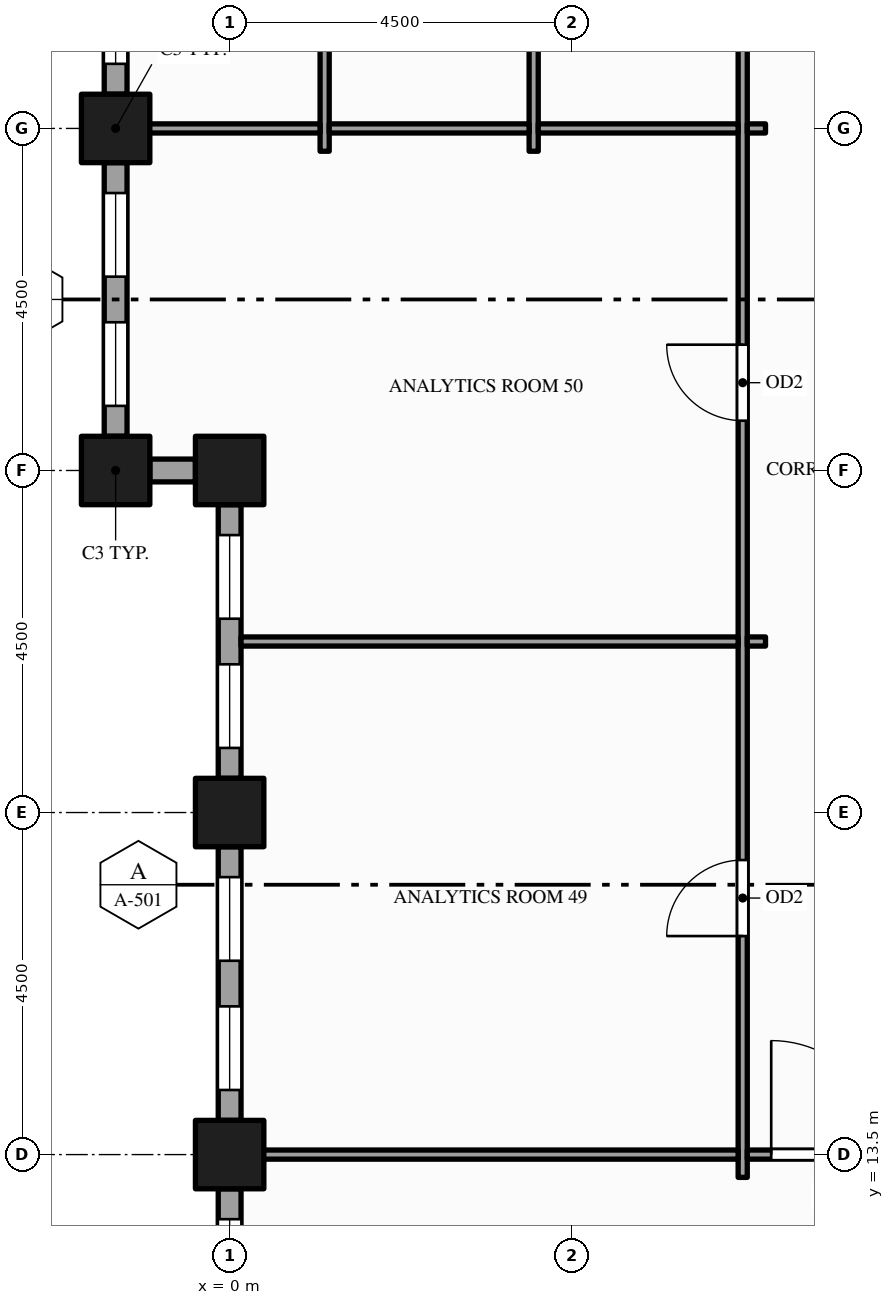
"""IFC4 building model, lengths in metres.
Left out: names, types, materials, properties, quantities, classifications, styles, units other than length and angle.
Written with IfcOpenShell. Run it as: python <this file> out.ifc"""

import sys

from ifc_helpers import new_model, si_unit, direction, frame, frame_2d, origin, origin_2d, place, context, subcontext, project, spatial, rectangle, hollow_rectangle, extrude, element, fill, save


model = new_model("IFC4")
c1 = context("Model", 3, precision=1e-05, world=origin(), true_north=direction((0.0, 1.0)))
c2 = subcontext(c1, "Body", "Model", "MODEL_VIEW")
j1 = project(units=[si_unit("LENGTHUNIT", "METRE"), si_unit("PLANEANGLEUNIT", "RADIAN")], contexts=[c1])
p1 = place(None, origin())
s1 = spatial("IfcSite", under=j1, at=p1, CompositionType="ELEMENT")
p2 = place(p1, origin())
s2 = spatial("IfcBuilding", under=s1, at=p2, CompositionType="ELEMENT")
p3 = place(p2, frame((0.0, 0.0, 171.0)))
s3 = spatial("IfcBuildingStorey", under=s2, at=p3, CompositionType="ELEMENT", Elevation=171.0)
for number, where, z_axis, x_axis in (
    (1, (-1.5, 22.5, -0.15), (0.0, 0.0, 1.0), (1.0, 0.0, 0.0)),
    (2, (-1.5, 27.0, -0.15), (0.0, 0.0, 1.0), (1.0, 0.0, 0.0)),
    (3, (0.0, 13.5, -0.15), (0.0, 0.0, 1.0), (1.0, 0.0, 0.0)),
    (4, (0.0, 18.0, -0.15), (0.0, 0.0, 1.0), (1.0, 0.0, 0.0)),
    (5, (0.0, 22.5, -0.15), (0.0, 0.0, 1.0), (1.0, 0.0, 0.0)),
):
    element("IfcColumn", number, at=place(p3, frame(where, z_axis=z_axis, x_axis=x_axis)), inside=s3, PredefinedType="COLUMN", context=c2, shape_type="SweptSolid", body=[
        extrude(hollow_rectangle(XDim=0.9, YDim=0.9, WallThickness=0.045, at=origin_2d()), origin(), (0.0, 0.0, 1.0), 4.0),
    ])
p4 = place(p3, frame((-1.5, 31.05, 0.0), z_axis=(0.0, 0.0, 1.0), x_axis=(0.0, -1.0, 0.0)))
e6 = element("IfcWall", 6, at=p4, inside=s3, PredefinedType="STANDARD", context=c2, shape_type="SweptSolid", body=[
    extrude(rectangle(XDim=3.6, YDim=0.3, at=frame_2d((1.8, 0.0))), origin(), (0.0, 0.0, 1.0), 3.149),
])
p5 = place(p4, frame((0.4, 0.0, 0.9)))
e7 = element("IfcOpeningElement", 7, at=p5, cuts=e6, PredefinedType="OPENING", context=c2, shape_type="SweptSolid", body=[
    extrude(rectangle(XDim=1.1, YDim=2.0, at=frame_2d((0.55, 1.0))), frame((0.0, 0.16, 0.0), z_axis=(0.0, -1.0, 0.0), x_axis=(1.0, 0.0, 0.0)), (0.0, 0.0, 1.0), 0.32),
])
p6 = place(p4, frame((2.1, 0.0, 0.9)))
e8 = element("IfcOpeningElement", 8, at=p6, cuts=e6, PredefinedType="OPENING", context=c2, shape_type="SweptSolid", body=[
    extrude(rectangle(XDim=1.1, YDim=2.0, at=frame_2d((0.55, 1.0))), frame((0.0, 0.16, 0.0), z_axis=(0.0, -1.0, 0.0), x_axis=(1.0, 0.0, 0.0)), (0.0, 0.0, 1.0), 0.32),
])
p7 = place(p3, frame((-1.5, 26.55, 0.0), z_axis=(0.0, 0.0, 1.0), x_axis=(0.0, -1.0, 0.0)))
e9 = element("IfcWall", 9, at=p7, inside=s3, PredefinedType="STANDARD", context=c2, shape_type="SweptSolid", body=[
    extrude(rectangle(XDim=3.6, YDim=0.3, at=frame_2d((1.8, 0.0))), origin(), (0.0, 0.0, 1.0), 3.149),
])
p8 = place(p7, frame((0.4, 0.0, 0.9)))
e10 = element("IfcOpeningElement", 10, at=p8, cuts=e9, PredefinedType="OPENING", context=c2, shape_type="SweptSolid", body=[
    extrude(rectangle(XDim=1.1, YDim=2.0, at=frame_2d((0.55, 1.0))), frame((0.0, 0.16, 0.0), z_axis=(0.0, -1.0, 0.0), x_axis=(1.0, 0.0, 0.0)), (0.0, 0.0, 1.0), 0.32),
])
p9 = place(p7, frame((2.1, 0.0, 0.9)))
e11 = element("IfcOpeningElement", 11, at=p9, cuts=e9, PredefinedType="OPENING", context=c2, shape_type="SweptSolid", body=[
    extrude(rectangle(XDim=1.1, YDim=2.0, at=frame_2d((0.55, 1.0))), frame((0.0, 0.16, 0.0), z_axis=(0.0, -1.0, 0.0), x_axis=(1.0, 0.0, 0.0)), (0.0, 0.0, 1.0), 0.32),
])
p10 = place(p3, frame((-1.05, 22.5, 0.0), z_axis=(0.0, 0.0, 1.0), x_axis=(1.0, 0.0, 0.0)))
e12 = element("IfcWall", 12, at=p10, inside=s3, PredefinedType="STANDARD", context=c2, shape_type="SweptSolid", body=[
    extrude(rectangle(XDim=0.6, YDim=0.3, at=frame_2d((0.3, 0.0))), origin(), (0.0, 0.0, 1.0), 3.149),
])
p11 = place(p3, frame((0.0, 22.05, 0.0), z_axis=(0.0, 0.0, 1.0), x_axis=(0.0, -1.0, 0.0)))
e13 = element("IfcWall", 13, at=p11, inside=s3, PredefinedType="STANDARD", context=c2, shape_type="SweptSolid", body=[
    extrude(rectangle(XDim=3.6, YDim=0.3, at=frame_2d((1.8, 0.0))), origin(), (0.0, 0.0, 1.0), 3.149),
])
p12 = place(p11, frame((0.4, 0.0, 0.9)))
e14 = element("IfcOpeningElement", 14, at=p12, cuts=e13, PredefinedType="OPENING", context=c2, shape_type="SweptSolid", body=[
    extrude(rectangle(XDim=1.1, YDim=2.0, at=frame_2d((0.55, 1.0))), frame((0.0, 0.16, 0.0), z_axis=(0.0, -1.0, 0.0), x_axis=(1.0, 0.0, 0.0)), (0.0, 0.0, 1.0), 0.32),
])
p13 = place(p11, frame((2.1, 0.0, 0.9)))
e15 = element("IfcOpeningElement", 15, at=p13, cuts=e13, PredefinedType="OPENING", context=c2, shape_type="SweptSolid", body=[
    extrude(rectangle(XDim=1.1, YDim=2.0, at=frame_2d((0.55, 1.0))), frame((0.0, 0.16, 0.0), z_axis=(0.0, -1.0, 0.0), x_axis=(1.0, 0.0, 0.0)), (0.0, 0.0, 1.0), 0.32),
])
p14 = place(p3, frame((0.0, 17.55, 0.0), z_axis=(0.0, 0.0, 1.0), x_axis=(0.0, -1.0, 0.0)))
e16 = element("IfcWall", 16, at=p14, inside=s3, PredefinedType="STANDARD", context=c2, shape_type="SweptSolid", body=[
    extrude(rectangle(XDim=3.6, YDim=0.3, at=frame_2d((1.8, 0.0))), origin(), (0.0, 0.0, 1.0), 3.149),
])
p15 = place(p14, frame((0.4, 0.0, 0.9)))
e17 = element("IfcOpeningElement", 17, at=p15, cuts=e16, PredefinedType="OPENING", context=c2, shape_type="SweptSolid", body=[
    extrude(rectangle(XDim=1.1, YDim=2.0, at=frame_2d((0.55, 1.0))), frame((0.0, 0.16, 0.0), z_axis=(0.0, -1.0, 0.0), x_axis=(1.0, 0.0, 0.0)), (0.0, 0.0, 1.0), 0.32),
])
p16 = place(p14, frame((2.1, 0.0, 0.9)))
e18 = element("IfcOpeningElement", 18, at=p16, cuts=e16, PredefinedType="OPENING", context=c2, shape_type="SweptSolid", body=[
    extrude(rectangle(XDim=1.1, YDim=2.0, at=frame_2d((0.55, 1.0))), frame((0.0, 0.16, 0.0), z_axis=(0.0, -1.0, 0.0), x_axis=(1.0, 0.0, 0.0)), (0.0, 0.0, 1.0), 0.32),
])
p17 = place(p3, frame((0.0, 13.05, 0.0), z_axis=(0.0, 0.0, 1.0), x_axis=(0.0, -1.0, 0.0)))
e19 = element("IfcWall", 19, at=p17, inside=s3, PredefinedType="STANDARD", context=c2, shape_type="SweptSolid", body=[
    extrude(rectangle(XDim=3.6, YDim=0.3, at=frame_2d((1.8, 0.0))), origin(), (0.0, 0.0, 1.0), 3.149),
])
p18 = place(p17, frame((0.4, 0.0, 0.9)))
e20 = element("IfcOpeningElement", 20, at=p18, cuts=e19, PredefinedType="OPENING", context=c2, shape_type="SweptSolid", body=[
    extrude(rectangle(XDim=1.1, YDim=2.0, at=frame_2d((0.55, 1.0))), frame((0.0, 0.16, 0.0), z_axis=(0.0, -1.0, 0.0), x_axis=(1.0, 0.0, 0.0)), (0.0, 0.0, 1.0), 0.32),
])
p19 = place(p17, frame((2.1, 0.0, 0.9)))
e21 = element("IfcOpeningElement", 21, at=p19, cuts=e19, PredefinedType="OPENING", context=c2, shape_type="SweptSolid", body=[
    extrude(rectangle(XDim=1.1, YDim=2.0, at=frame_2d((0.55, 1.0))), frame((0.0, 0.16, 0.0), z_axis=(0.0, -1.0, 0.0), x_axis=(1.0, 0.0, 0.0)), (0.0, 0.0, 1.0), 0.32),
])
for number, where, z_axis, x_axis in (
    (22, (1.25, 26.7, 0.0), (0.0, 0.0, 1.0), (0.0, 1.0, 0.0)),
    (23, (4.0, 26.7, 0.0), (0.0, 0.0, 1.0), (0.0, 1.0, 0.0)),
):
    element("IfcWall", number, at=place(p3, frame(where, z_axis=z_axis, x_axis=x_axis)), inside=s3, PredefinedType="PARTITIONING", context=c2, shape_type="SweptSolid", body=[
        extrude(rectangle(XDim=5.1, YDim=0.12, at=frame_2d((2.55, 0.0))), origin(), (0.0, 0.0, 1.0), 3.85),
    ])
p20 = place(p3, frame((6.75, 13.2, 0.0), z_axis=(0.0, 0.0, 1.0), x_axis=(0.0, 1.0, 0.0)))
e24 = element("IfcWall", 24, at=p20, inside=s3, PredefinedType="PARTITIONING", context=c2, shape_type="SweptSolid", body=[
    extrude(rectangle(XDim=18.6, YDim=0.12, at=frame_2d((9.3, 0.0))), origin(), (0.0, 0.0, 1.0), 2.6),
])
p21 = place(p20, frame((3.175, 0.0, 0.0)))
e25 = element("IfcOpeningElement", 25, at=p21, cuts=e24, PredefinedType="OPENING", context=c2, shape_type="SweptSolid", body=[
    extrude(rectangle(XDim=1.0, YDim=2.1, at=frame_2d((0.5, 1.05))), frame((0.0, 0.07, 0.0), z_axis=(0.0, -1.0, 0.0), x_axis=(1.0, 0.0, 0.0)), (0.0, 0.0, 1.0), 0.14),
])
p22 = place(p20, frame((9.955, 0.0, 0.0)))
e26 = element("IfcOpeningElement", 26, at=p22, cuts=e24, PredefinedType="OPENING", context=c2, shape_type="SweptSolid", body=[
    extrude(rectangle(XDim=1.0, YDim=2.1, at=frame_2d((0.5, 1.05))), frame((0.0, 0.07, 0.0), z_axis=(0.0, -1.0, 0.0), x_axis=(1.0, 0.0, 0.0)), (0.0, 0.0, 1.0), 0.14),
])
p23 = place(p3, frame((0.15, 13.5, 0.0), z_axis=(0.0, 0.0, 1.0), x_axis=(1.0, 0.0, 0.0)))
e27 = element("IfcWall", 27, at=p23, inside=s3, PredefinedType="PARTITIONING", context=c2, shape_type="SweptSolid", body=[
    extrude(rectangle(XDim=6.54, YDim=0.12, at=frame_2d((3.27, 0.0))), origin(), (0.0, 0.0, 1.0), 2.87),
])
p24 = place(p3, frame((6.81, 13.5, 0.0), z_axis=(0.0, 0.0, 1.0), x_axis=(1.0, 0.0, 0.0)))
e28 = element("IfcWall", 28, at=p24, inside=s3, PredefinedType="PARTITIONING", context=c2, shape_type="SweptSolid", body=[
    extrude(rectangle(XDim=2.13, YDim=0.12, at=frame_2d((1.065, 0.0))), origin(), (0.0, 0.0, 1.0), 2.87),
])
p25 = place(p24, frame((0.315, 0.0, 0.0)))
e29 = element("IfcOpeningElement", 29, at=p25, cuts=e28, PredefinedType="OPENING", context=c2, shape_type="SweptSolid", body=[
    extrude(rectangle(XDim=1.5, YDim=2.1, at=frame_2d((0.75, 1.05))), frame((0.0, 0.07, 0.0), z_axis=(0.0, -1.0, 0.0), x_axis=(1.0, 0.0, 0.0)), (0.0, 0.0, 1.0), 0.14),
])
p26 = place(p3, frame((0.15, 20.25, 0.0), z_axis=(0.0, 0.0, 1.0), x_axis=(1.0, 0.0, 0.0)))
e30 = element("IfcWall", 30, at=p26, inside=s3, PredefinedType="PARTITIONING", context=c2, shape_type="SweptSolid", body=[
    extrude(rectangle(XDim=6.54, YDim=0.12, at=frame_2d((3.27, 0.0))), origin(), (0.0, 0.0, 1.0), 2.87),
])
p27 = place(p3, frame((6.81, 20.25, 0.0), z_axis=(0.0, 0.0, 1.0), x_axis=(1.0, 0.0, 0.0)))
e31 = element("IfcWall", 31, at=p27, inside=s3, PredefinedType="PARTITIONING", context=c2, shape_type="SweptSolid", body=[
    extrude(rectangle(XDim=0.24, YDim=0.12, at=frame_2d((0.12, 0.0))), origin(), (0.0, 0.0, 1.0), 2.87),
])
p28 = place(p3, frame((-1.35, 27.0, 0.0), z_axis=(0.0, 0.0, 1.0), x_axis=(1.0, 0.0, 0.0)))
e32 = element("IfcWall", 32, at=p28, inside=s3, PredefinedType="PARTITIONING", context=c2, shape_type="SweptSolid", body=[
    extrude(rectangle(XDim=2.54, YDim=0.12, at=frame_2d((1.27, 0.0))), origin(), (0.0, 0.0, 1.0), 2.87),
])
for number, where, z_axis, x_axis in (
    (33, (1.31, 27.0, 0.0), (0.0, 0.0, 1.0), (1.0, 0.0, 0.0)),
    (34, (4.06, 27.0, 0.0), (0.0, 0.0, 1.0), (1.0, 0.0, 0.0)),
):
    element("IfcWall", number, at=place(p3, frame(where, z_axis=z_axis, x_axis=x_axis)), inside=s3, PredefinedType="PARTITIONING", context=c2, shape_type="SweptSolid", body=[
        extrude(rectangle(XDim=2.63, YDim=0.12, at=frame_2d((1.315, 0.0))), origin(), (0.0, 0.0, 1.0), 2.87),
    ])
p29 = place(p3, frame((6.81, 27.0, 0.0), z_axis=(0.0, 0.0, 1.0), x_axis=(1.0, 0.0, 0.0)))
e35 = element("IfcWall", 35, at=p29, inside=s3, PredefinedType="PARTITIONING", context=c2, shape_type="SweptSolid", body=[
    extrude(rectangle(XDim=0.24, YDim=0.12, at=frame_2d((0.12, 0.0))), origin(), (0.0, 0.0, 1.0), 2.87),
])
p30 = place(p6, origin())
e36 = element("IfcWindow", 36, at=p30, inside=s3, PartitioningType="SINGLE_PANEL", PredefinedType="WINDOW", context=c2, shape_type="SweptSolid", body=[
    extrude(rectangle(XDim=1.1, YDim=2.0, at=frame_2d((0.55, 1.0))), frame((0.0, 0.03, 0.0), z_axis=(0.0, -1.0, 0.0), x_axis=(1.0, 0.0, 0.0)), (0.0, 0.0, 1.0), 0.06),
])
fill(e8, e36)
p31 = place(p8, origin())
e37 = element("IfcWindow", 37, at=p31, inside=s3, PartitioningType="SINGLE_PANEL", PredefinedType="WINDOW", context=c2, shape_type="SweptSolid", body=[
    extrude(rectangle(XDim=1.1, YDim=2.0, at=frame_2d((0.55, 1.0))), frame((0.0, 0.03, 0.0), z_axis=(0.0, -1.0, 0.0), x_axis=(1.0, 0.0, 0.0)), (0.0, 0.0, 1.0), 0.06),
])
fill(e10, e37)
p32 = place(p9, origin())
e38 = element("IfcWindow", 38, at=p32, inside=s3, PartitioningType="SINGLE_PANEL", PredefinedType="WINDOW", context=c2, shape_type="SweptSolid", body=[
    extrude(rectangle(XDim=1.1, YDim=2.0, at=frame_2d((0.55, 1.0))), frame((0.0, 0.03, 0.0), z_axis=(0.0, -1.0, 0.0), x_axis=(1.0, 0.0, 0.0)), (0.0, 0.0, 1.0), 0.06),
])
fill(e11, e38)
p33 = place(p12, origin())
e39 = element("IfcWindow", 39, at=p33, inside=s3, PartitioningType="SINGLE_PANEL", PredefinedType="WINDOW", context=c2, shape_type="SweptSolid", body=[
    extrude(rectangle(XDim=1.1, YDim=2.0, at=frame_2d((0.55, 1.0))), frame((0.0, 0.03, 0.0), z_axis=(0.0, -1.0, 0.0), x_axis=(1.0, 0.0, 0.0)), (0.0, 0.0, 1.0), 0.06),
])
fill(e14, e39)
p34 = place(p13, origin())
e40 = element("IfcWindow", 40, at=p34, inside=s3, PartitioningType="SINGLE_PANEL", PredefinedType="WINDOW", context=c2, shape_type="SweptSolid", body=[
    extrude(rectangle(XDim=1.1, YDim=2.0, at=frame_2d((0.55, 1.0))), frame((0.0, 0.03, 0.0), z_axis=(0.0, -1.0, 0.0), x_axis=(1.0, 0.0, 0.0)), (0.0, 0.0, 1.0), 0.06),
])
fill(e15, e40)
p35 = place(p15, origin())
e41 = element("IfcWindow", 41, at=p35, inside=s3, PartitioningType="SINGLE_PANEL", PredefinedType="WINDOW", context=c2, shape_type="SweptSolid", body=[
    extrude(rectangle(XDim=1.1, YDim=2.0, at=frame_2d((0.55, 1.0))), frame((0.0, 0.03, 0.0), z_axis=(0.0, -1.0, 0.0), x_axis=(1.0, 0.0, 0.0)), (0.0, 0.0, 1.0), 0.06),
])
fill(e17, e41)
p36 = place(p16, origin())
e42 = element("IfcWindow", 42, at=p36, inside=s3, PartitioningType="SINGLE_PANEL", PredefinedType="WINDOW", context=c2, shape_type="SweptSolid", body=[
    extrude(rectangle(XDim=1.1, YDim=2.0, at=frame_2d((0.55, 1.0))), frame((0.0, 0.03, 0.0), z_axis=(0.0, -1.0, 0.0), x_axis=(1.0, 0.0, 0.0)), (0.0, 0.0, 1.0), 0.06),
])
fill(e18, e42)
p37 = place(p18, origin())
e43 = element("IfcWindow", 43, at=p37, inside=s3, PartitioningType="SINGLE_PANEL", PredefinedType="WINDOW", context=c2, shape_type="SweptSolid", body=[
    extrude(rectangle(XDim=1.1, YDim=2.0, at=frame_2d((0.55, 1.0))), frame((0.0, 0.03, 0.0), z_axis=(0.0, -1.0, 0.0), x_axis=(1.0, 0.0, 0.0)), (0.0, 0.0, 1.0), 0.06),
])
fill(e20, e43)
p38 = place(p25, origin())
e44 = element("IfcDoor", 44, at=p38, inside=s3, OperationType="SINGLE_SWING_LEFT", PredefinedType="DOOR", context=c2, shape_type="SweptSolid", body=[
    extrude(rectangle(XDim=1.5, YDim=2.1, at=frame_2d((0.75, 1.05))), frame((0.0, 0.025, 0.0), z_axis=(0.0, -1.0, 0.0), x_axis=(1.0, 0.0, 0.0)), (0.0, 0.0, 1.0), 0.05),
])
fill(e29, e44)
p39 = place(p21, origin())
e45 = element("IfcDoor", 45, at=p39, inside=s3, OperationType="SINGLE_SWING_LEFT", PredefinedType="DOOR", context=c2, shape_type="SweptSolid", body=[
    extrude(rectangle(XDim=1.0, YDim=2.1, at=frame_2d((0.5, 1.05))), frame((0.0, 0.025, 0.0), z_axis=(0.0, -1.0, 0.0), x_axis=(1.0, 0.0, 0.0)), (0.0, 0.0, 1.0), 0.05),
])
fill(e25, e45)
p40 = place(p22, origin())
e46 = element("IfcDoor", 46, at=p40, inside=s3, OperationType="SINGLE_SWING_RIGHT", PredefinedType="DOOR", context=c2, shape_type="SweptSolid", body=[
    extrude(rectangle(XDim=1.0, YDim=2.1, at=frame_2d((0.5, 1.05))), frame((0.0, 0.025, 0.0), z_axis=(0.0, -1.0, 0.0), x_axis=(1.0, 0.0, 0.0)), (0.0, 0.0, 1.0), 0.05),
])
fill(e26, e46)
save(model, sys.argv[1])
